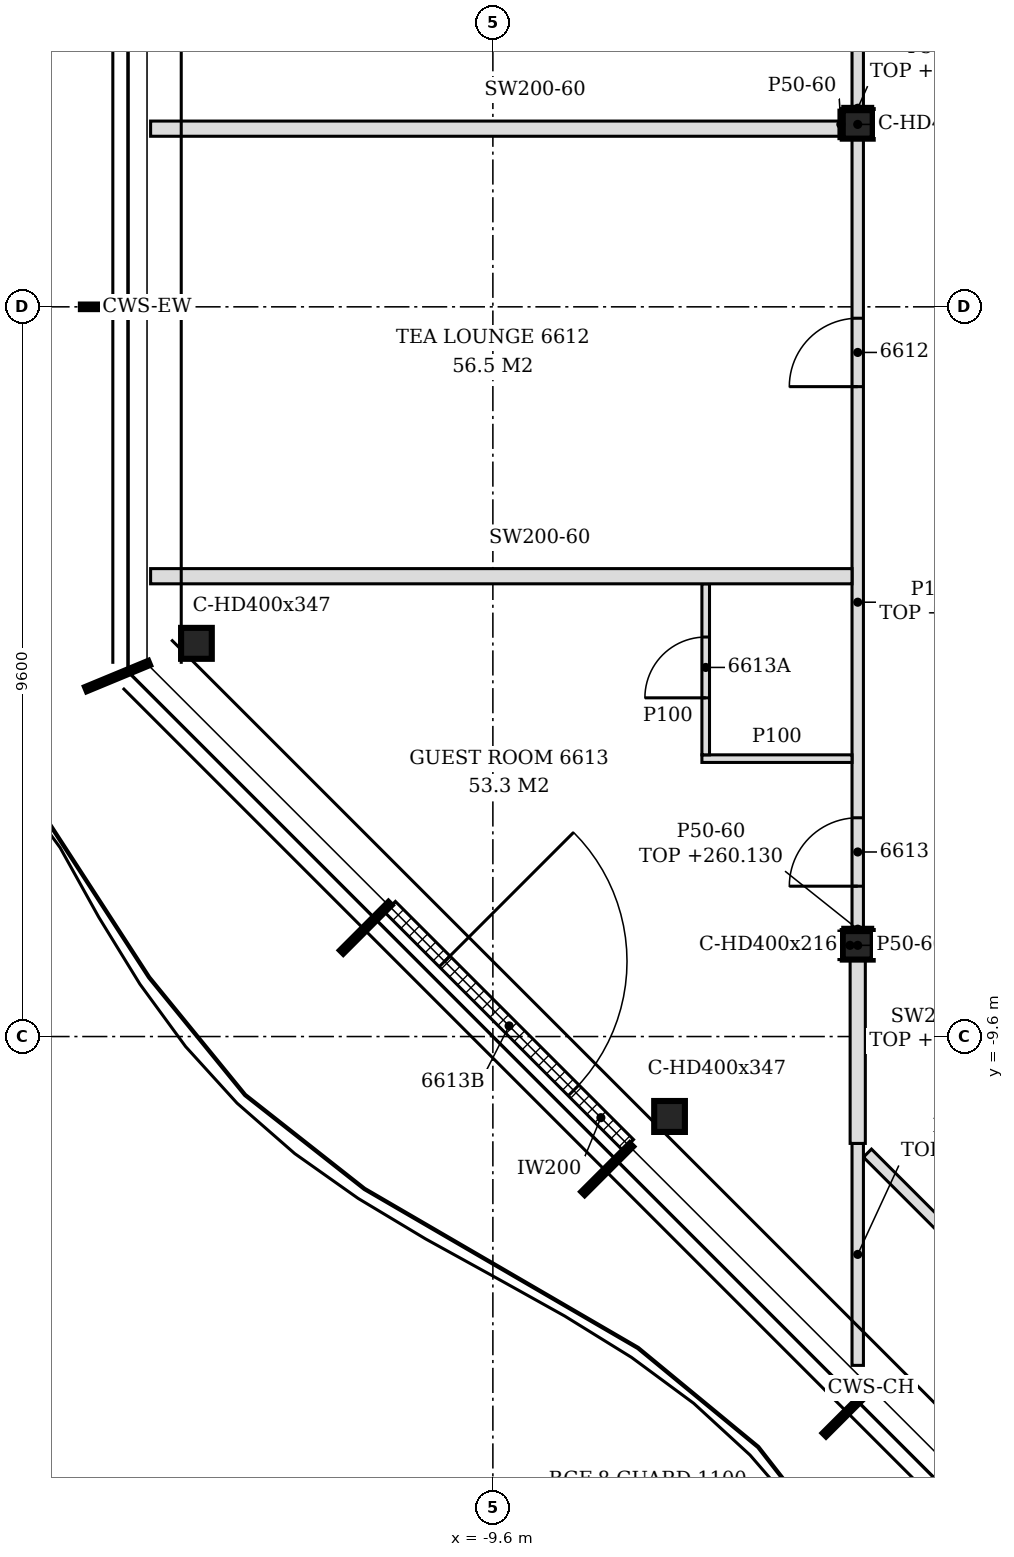
"""IFC4 building model, lengths in metres.
Left out: names, types, materials, properties, quantities, classifications, styles, units other than length and angle.
Written with IfcOpenShell. Run it as: python <this file> out.ifc"""

import sys

from ifc_helpers import new_model, si_unit, direction, frame, frame_2d, origin, origin_2d, place, context, subcontext, project, spatial, polyline, rectangle, i_section, outline, extrude, clip, halfspace, element, fill, save


model = new_model("IFC4")
c1 = context("Model", 3, precision=1e-05, world=origin(), true_north=direction((0.0, 1.0)))
c2 = subcontext(c1, "Body", "Model", "MODEL_VIEW")
j1 = project(units=[si_unit("LENGTHUNIT", "METRE"), si_unit("PLANEANGLEUNIT", "RADIAN")], contexts=[c1])
p1 = place(None, origin())
s1 = spatial("IfcSite", under=j1, at=p1, CompositionType="ELEMENT")
p2 = place(p1, origin())
s2 = spatial("IfcBuilding", under=s1, at=p2, CompositionType="ELEMENT")
p3 = place(p2, frame((0.0, 0.0, 257.4)))
s3 = spatial("IfcBuildingStorey", under=s2, at=p3, CompositionType="ELEMENT", Elevation=257.4)
for number, where, z_axis, x_axis in (
    (1, (-13.5, -4.427, -0.15), (0.0, 0.0, 1.0), (1.0, 0.0, 0.0)),
    (2, (-7.276, -10.652, -0.15), (0.0, 0.0, 1.0), (1.0, 0.0, 0.0)),
):
    element("IfcColumn", number, at=place(p3, frame(where, z_axis=z_axis, x_axis=x_axis)), inside=s3, PredefinedType="COLUMN", context=c2, shape_type="Clipping", body=[
        clip(extrude(i_section(OverallWidth=0.404, OverallDepth=0.407, WebThickness=0.027, FlangeThickness=0.044, FilletRadius=0.015, at=origin_2d()), origin(), (0.0, 0.0, 1.0), 3.5), halfspace(frame((0.0, 0.0, 3.05), z_axis=(0.0, 0.0, 1.0), x_axis=(1.0, 0.0, 0.0)), False)),
    ])
for number, where, z_axis, x_axis in (
    (3, (-4.8, -8.4, -0.15), (0.0, 0.0, 1.0), (1.0, 0.0, 0.0)),
    (4, (-4.8, 2.4, -0.15), (0.0, 0.0, 1.0), (1.0, 0.0, 0.0)),
):
    element("IfcColumn", number, at=place(p3, frame(where, z_axis=z_axis, x_axis=x_axis)), inside=s3, PredefinedType="COLUMN", context=c2, shape_type="SweptSolid", body=[
        extrude(i_section(OverallWidth=0.394, OverallDepth=0.375, WebThickness=0.017, FlangeThickness=0.028, FilletRadius=0.015, at=origin_2d()), origin(), (0.0, 0.0, 1.0), 3.5),
    ])
p4 = place(p3, frame((-10.953, -7.893, 0.0), z_axis=(0.0, 0.0, 1.0), x_axis=(0.707106781187, -0.707106781187, 0.0)))
e5 = element("IfcWall", 5, at=p4, inside=s3, PredefinedType="NOTDEFINED", context=c2, shape_type="SweptSolid", body=[
    extrude(rectangle(XDim=4.431, YDim=0.2, at=frame_2d((2.215, 0.0))), origin(), (0.0, 0.0, 1.0), 3.35),
])
p5 = place(p4, frame((1.015, 0.0, 0.0)))
e6 = element("IfcOpeningElement", 6, at=p5, cuts=e5, PredefinedType="OPENING", context=c2, shape_type="SweptSolid", body=[
    extrude(rectangle(XDim=2.4, YDim=2.4, at=frame_2d((1.2, 1.2))), frame((0.0, 0.11, 0.0), z_axis=(0.0, -1.0, 0.0), x_axis=(1.0, 0.0, 0.0)), (0.0, 0.0, 1.0), 0.22),
])
p6 = place(p3, frame((-1.534, -14.272, 0.0), z_axis=(0.0, 0.0, 1.0), x_axis=(-0.707134287042, 0.707079274261, 0.0)))
e7 = element("IfcWall", 7, at=p6, inside=s3, PredefinedType="PARTITIONING", context=c2, shape_type="SweptSolid", body=[
    extrude(rectangle(XDim=4.438, YDim=0.15, at=frame_2d((2.219, 0.0))), origin(), (0.0, 0.0, 1.0), 2.83),
])
p7 = place(p3, frame((-4.8, -13.926, 0.0), z_axis=(0.0, 0.0, 1.0), x_axis=(0.0, 1.0, 0.0)))
e8 = element("IfcWall", 8, at=p7, inside=s3, PredefinedType="PARTITIONING", context=c2, shape_type="SweptSolid", body=[
    extrude(outline(polyline([(0.0, 0.0), (2.92, 0.0), (2.92, 2.93), (1.581, 2.93), (1.579, 2.33), (0.017, 2.33), (0.015, 2.93), (0.0, 2.93), (0.0, 0.0)])), frame((0.0, 0.075, 0.0), z_axis=(0.0, -1.0, 0.0), x_axis=(1.0, 0.0, 0.0)), (0.0, 0.0, 1.0), 0.15),
])
p8 = place(p3, frame((-4.8, -11.006, 0.0), z_axis=(0.0, 0.0, 1.0), x_axis=(0.0, 1.0, 0.0)))
e9 = element("IfcWall", 9, at=p8, inside=s3, PredefinedType="PARTITIONING", context=c2, shape_type="SweptSolid", body=[
    extrude(rectangle(XDim=2.419, YDim=0.2, at=frame_2d((1.209, 0.0))), origin(), (0.0, 0.0, 1.0), 2.93),
])
p9 = place(p3, frame((-4.603, -8.4, 0.0), z_axis=(0.0, 0.0, 1.0), x_axis=(1.0, 0.0, 0.0)))
e10 = element("IfcWall", 10, at=p9, inside=s3, PredefinedType="PARTITIONING", context=c2, shape_type="SweptSolid", body=[
    extrude(rectangle(XDim=9.478, YDim=0.15, at=frame_2d((4.739, 0.0))), origin(), (0.0, 0.0, 1.0), 2.73),
])
p10 = place(p9, frame((4.153, 0.0, 0.0)))
e11 = element("IfcOpeningElement", 11, at=p10, cuts=e10, PredefinedType="OPENING", context=c2, shape_type="SweptSolid", body=[
    extrude(rectangle(XDim=0.9, YDim=2.1, at=frame_2d((0.45, 1.05))), frame((0.0, 0.085, 0.0), z_axis=(0.0, -1.0, 0.0), x_axis=(1.0, 0.0, 0.0)), (0.0, 0.0, 1.0), 0.17),
])
p11 = place(p3, frame((-4.8, -8.212, 0.0), z_axis=(0.0, 0.0, 1.0), x_axis=(0.0, 1.0, 0.0)))
e12 = element("IfcWall", 12, at=p11, inside=s3, PredefinedType="PARTITIONING", context=c2, shape_type="SweptSolid", body=[
    extrude(rectangle(XDim=10.425, YDim=0.15, at=frame_2d((5.212, 0.0))), origin(), (0.0, 0.0, 1.0), 2.73),
])
p12 = place(p11, frame((7.163, 0.0, 0.0)))
e13 = element("IfcOpeningElement", 13, at=p12, cuts=e12, PredefinedType="OPENING", context=c2, shape_type="SweptSolid", body=[
    extrude(rectangle(XDim=0.9, YDim=2.1, at=frame_2d((0.45, 1.05))), frame((0.0, 0.085, 0.0), z_axis=(0.0, -1.0, 0.0), x_axis=(1.0, 0.0, 0.0)), (0.0, 0.0, 1.0), 0.17),
])
p13 = place(p11, frame((0.591, 0.0, 0.0)))
e14 = element("IfcOpeningElement", 14, at=p13, cuts=e12, PredefinedType="OPENING", context=c2, shape_type="SweptSolid", body=[
    extrude(rectangle(XDim=0.9, YDim=2.1, at=frame_2d((0.45, 1.05))), frame((0.0, 0.085, 0.0), z_axis=(0.0, -1.0, 0.0), x_axis=(1.0, 0.0, 0.0)), (0.0, 0.0, 1.0), 0.17),
])
p14 = place(p3, frame((-6.85, -5.944, 0.0), z_axis=(0.0, 0.0, 1.0), x_axis=(1.0, 0.0, 0.0)))
e15 = element("IfcWall", 15, at=p14, inside=s3, PredefinedType="PARTITIONING", context=c2, shape_type="SweptSolid", body=[
    extrude(outline(polyline([(0.0, 0.0), (1.975, 0.0), (1.975, 2.73), (1.9, 2.73), (1.898, 3.35), (0.0, 3.35), (0.0, 0.0)])), frame((0.0, 0.05, 0.0), z_axis=(0.0, -1.0, 0.0), x_axis=(1.0, 0.0, 0.0)), (0.0, 0.0, 1.0), 0.1),
])
p15 = place(p3, frame((-6.8, -5.894, 0.0), z_axis=(0.0, 0.0, 1.0), x_axis=(0.0, 1.0, 0.0)))
e16 = element("IfcWall", 16, at=p15, inside=s3, PredefinedType="PARTITIONING", context=c2, shape_type="SweptSolid", body=[
    extrude(outline(polyline([(0.0, 0.0), (2.25, 0.0), (2.25, 3.35), (1.189, 3.35), (1.187, 2.88), (0.999, 2.88), (0.997, 3.35), (0.0, 3.35), (0.0, 0.0)])), frame((0.0, 0.05, 0.0), z_axis=(0.0, -1.0, 0.0), x_axis=(1.0, 0.0, 0.0)), (0.0, 0.0, 1.0), 0.1),
])
p16 = place(p15, frame((0.75, 0.0, 0.0)))
e17 = element("IfcOpeningElement", 17, at=p16, cuts=e16, PredefinedType="OPENING", context=c2, shape_type="SweptSolid", body=[
    extrude(rectangle(XDim=0.8, YDim=2.1, at=frame_2d((0.4, 1.05))), frame((0.0, 0.06, 0.0), z_axis=(0.0, -1.0, 0.0), x_axis=(1.0, 0.0, 0.0)), (0.0, 0.0, 1.0), 0.12),
])
p17 = place(p3, frame((-14.103, -3.544, 0.0), z_axis=(0.0, 0.0, 1.0), x_axis=(1.0, 0.0, 0.0)))
e18 = element("IfcWall", 18, at=p17, inside=s3, PredefinedType="PARTITIONING", context=c2, shape_type="SweptSolid", body=[
    extrude(outline(polyline([(0.0, 0.0), (9.228, 0.0), (9.228, 2.73), (9.153, 2.73), (9.151, 3.35), (1.541, 3.35), (1.539, 3.195), (1.229, 3.195), (1.227, 2.687), (1.103, 2.687), (1.101, 2.33), (0.103, 2.33), (0.101, 3.35), (0.0, 3.35), (0.0, 0.0)])), frame((0.0, 0.1, 0.0), z_axis=(0.0, -1.0, 0.0), x_axis=(1.0, 0.0, 0.0)), (0.0, 0.0, 1.0), 0.2),
])
p18 = place(p3, frame((-14.103, 2.344, 0.0), z_axis=(0.0, 0.0, 1.0), x_axis=(1.0, 0.0, 0.0)))
e19 = element("IfcWall", 19, at=p18, inside=s3, PredefinedType="PARTITIONING", context=c2, shape_type="SweptSolid", body=[
    extrude(outline(polyline([(0.0, 0.0), (9.106, 0.0), (9.106, 3.35), (1.103, 3.35), (1.101, 2.33), (0.103, 2.33), (0.101, 3.35), (0.0, 3.35), (0.0, 0.0)])), frame((0.0, 0.1, 0.0), z_axis=(0.0, -1.0, 0.0), x_axis=(1.0, 0.0, 0.0)), (0.0, 0.0, 1.0), 0.2),
])
p19 = place(p3, frame((-4.8, 2.587, 0.0), z_axis=(0.0, 0.0, 1.0), x_axis=(0.0, 1.0, 0.0)))
e20 = element("IfcWall", 20, at=p19, inside=s3, PredefinedType="PARTITIONING", context=c2, shape_type="SweptSolid", body=[
    extrude(outline(polyline([(0.0, 0.0), (10.425, 0.0), (10.425, 2.33), (9.758, 2.33), (9.756, 2.73), (0.0, 2.73), (0.0, 0.0)])), frame((0.0, 0.075, 0.0), z_axis=(0.0, -1.0, 0.0), x_axis=(1.0, 0.0, 0.0)), (0.0, 0.0, 1.0), 0.15),
])
for number, where, z_axis, x_axis in (
    (21, (-5.022, -8.587, 0.0), (0.0, 0.0, 1.0), (0.0, 1.0, 0.0)),
    (22, (-5.022, 2.212, 0.0), (0.0, 0.0, 1.0), (0.0, 1.0, 0.0)),
):
    element("IfcWall", number, at=place(p3, frame(where, z_axis=z_axis, x_axis=x_axis)), inside=s3, PredefinedType="PARTITIONING", context=c2, shape_type="SweptSolid", body=[
        extrude(rectangle(XDim=0.375, YDim=0.05, at=frame_2d((0.188, 0.0))), origin(), (0.0, 0.0, 1.0), 3.35),
    ])
for number, where, z_axis, x_axis in (
    (23, (-4.997, -8.188, 0.0), (0.0, 0.0, 1.0), (1.0, 0.0, 0.0)),
    (24, (-4.997, 2.613, 0.0), (0.0, 0.0, 1.0), (1.0, 0.0, 0.0)),
):
    element("IfcWall", number, at=place(p3, frame(where, z_axis=z_axis, x_axis=x_axis)), inside=s3, PredefinedType="PARTITIONING", context=c2, shape_type="SweptSolid", body=[
        extrude(rectangle(XDim=0.394, YDim=0.05, at=frame_2d((0.197, 0.0))), origin(), (0.0, 0.0, 1.0), 2.73),
    ])
p20 = place(p5, origin())
e25 = element("IfcDoor", 25, at=p20, inside=s3, OperationType="SINGLE_SWING_LEFT", PredefinedType="DOOR", context=c2, shape_type="SweptSolid", body=[
    extrude(rectangle(XDim=2.4, YDim=2.4, at=frame_2d((1.2, 1.2))), frame((0.0, 0.025, 0.0), z_axis=(0.0, -1.0, 0.0), x_axis=(1.0, 0.0, 0.0)), (0.0, 0.0, 1.0), 0.05),
])
fill(e6, e25)
p21 = place(p12, origin())
e26 = element("IfcDoor", 26, at=p21, inside=s3, OperationType="SINGLE_SWING_LEFT", PredefinedType="DOOR", context=c2, shape_type="SweptSolid", body=[
    extrude(rectangle(XDim=0.9, YDim=2.1, at=frame_2d((0.45, 1.05))), frame((0.0, 0.025, 0.0), z_axis=(0.0, -1.0, 0.0), x_axis=(1.0, 0.0, 0.0)), (0.0, 0.0, 1.0), 0.05),
])
fill(e13, e26)
p22 = place(p13, origin())
e27 = element("IfcDoor", 27, at=p22, inside=s3, OperationType="SINGLE_SWING_LEFT", PredefinedType="DOOR", context=c2, shape_type="SweptSolid", body=[
    extrude(rectangle(XDim=0.9, YDim=2.1, at=frame_2d((0.45, 1.05))), frame((0.0, 0.025, 0.0), z_axis=(0.0, -1.0, 0.0), x_axis=(1.0, 0.0, 0.0)), (0.0, 0.0, 1.0), 0.05),
])
fill(e14, e27)
p23 = place(p16, origin())
e28 = element("IfcDoor", 28, at=p23, inside=s3, OperationType="SINGLE_SWING_LEFT", PredefinedType="DOOR", context=c2, shape_type="SweptSolid", body=[
    extrude(rectangle(XDim=0.8, YDim=2.1, at=frame_2d((0.4, 1.05))), frame((0.0, 0.025, 0.0), z_axis=(0.0, -1.0, 0.0), x_axis=(1.0, 0.0, 0.0)), (0.0, 0.0, 1.0), 0.05),
])
fill(e17, e28)
save(model, sys.argv[1])
